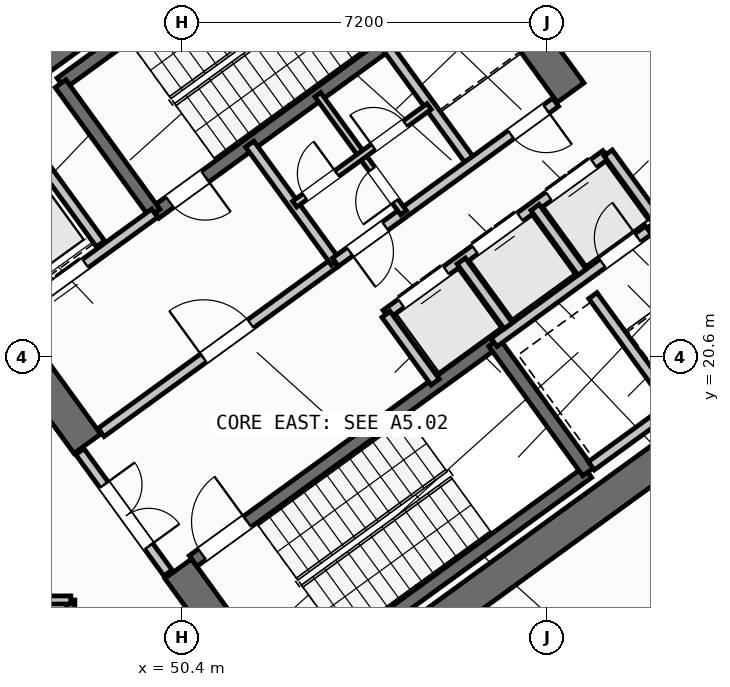
"""IFC4 building model, lengths in metres.
Left out: names, types, materials, properties, quantities, classifications, styles, units other than length and angle.
Written with IfcOpenShell. Run it as: python <this file> out.ifc"""

import sys

from ifc_helpers import new_model, si_unit, direction, frame, frame_2d, origin, place, context, subcontext, project, spatial, rectangle, extrude, source, transform, mapped, element, fill, save


model = new_model("IFC4")
c1 = context("Model", 3, precision=1e-05, world=origin(), true_north=direction((0.0, 1.0)))
c2 = subcontext(c1, "Body", "Model", "MODEL_VIEW")
j1 = project(units=[si_unit("LENGTHUNIT", "METRE"), si_unit("PLANEANGLEUNIT", "RADIAN")], contexts=[c1])
p1 = place(None, origin())
s1 = spatial("IfcSite", under=j1, at=p1, CompositionType="ELEMENT")
p2 = place(p1, origin())
s2 = spatial("IfcBuilding", under=s1, at=p2, CompositionType="ELEMENT")
p3 = place(p2, frame((0.0, 0.0, 5.4)))
s3 = spatial("IfcBuildingStorey", under=s2, at=p3, CompositionType="ELEMENT", Elevation=5.4)
p4 = place(p3, frame((52.318, 13.11, 0.0), z_axis=(0.0, 0.0, 1.0), x_axis=(0.809019445368, 0.587781878776, 0.0)))
e1 = element("IfcWall", 1, at=p4, inside=s3, PredefinedType="SHEAR", context=c2, shape_type="SweptSolid", body=[
    extrude(rectangle(XDim=12.44, YDim=0.65, at=frame_2d((6.22, 0.0))), origin(), (0.0, 0.0, 1.0), 4.45),
])
p5 = place(p3, frame((44.325, 24.113, 0.0), z_axis=(0.0, 0.0, 1.0), x_axis=(0.809012664862, 0.58779121131, 0.0)))
e2 = element("IfcWall", 2, at=p5, inside=s3, PredefinedType="SHEAR", context=c2, shape_type="SweptSolid", body=[
    extrude(rectangle(XDim=12.44, YDim=0.65, at=frame_2d((6.22, 0.0))), origin(), (0.0, 0.0, 1.0), 4.45),
])
p6 = place(p3, frame((52.39, 13.564, 0.0), z_axis=(0.0, 0.0, 1.0), x_axis=(-0.58779688989, 0.809008539037, 0.0)))
e3 = element("IfcWall", 3, at=p6, inside=s3, PredefinedType="SHEAR", context=c2, shape_type="SweptSolid", body=[
    extrude(rectangle(XDim=3.525, YDim=0.65, at=frame_2d((1.763, 0.0))), origin(), (0.0, 0.0, 1.0), 4.45),
])
p7 = place(p3, frame((48.526, 18.884, 0.0), z_axis=(0.0, 0.0, 1.0), x_axis=(-0.58777996584, 0.809020835181, 0.0)))
e4 = element("IfcWall", 4, at=p7, inside=s3, PredefinedType="SHEAR", context=c2, shape_type="SweptSolid", body=[
    extrude(rectangle(XDim=6.375, YDim=0.65, at=frame_2d((3.188, 0.0))), origin(), (0.0, 0.0, 1.0), 4.45),
])
p8 = place(p3, frame((61.929, 20.494, 0.0), z_axis=(0.0, 0.0, 1.0), x_axis=(-0.58782982593, 0.808984607855, 0.0)))
e5 = element("IfcWall", 5, at=p8, inside=s3, PredefinedType="SHEAR", context=c2, shape_type="SweptSolid", body=[
    extrude(rectangle(XDim=3.525, YDim=0.65, at=frame_2d((1.762, 0.0))), origin(), (0.0, 0.0, 1.0), 4.45),
])
p9 = place(p3, frame((58.064, 25.813, 0.0), z_axis=(0.0, 0.0, 1.0), x_axis=(-0.58777996584, 0.809020835181, 0.0)))
e6 = element("IfcWall", 6, at=p9, inside=s3, PredefinedType="SHEAR", context=c2, shape_type="SweptSolid", body=[
    extrude(rectangle(XDim=6.375, YDim=0.65, at=frame_2d((3.188, 0.0))), origin(), (0.0, 0.0, 1.0), 4.45),
])
p10 = place(p3, frame((48.006, 25.996, 0.0), z_axis=(0.0, 0.0, 1.0), x_axis=(0.80901903764, 0.587782439969, 0.0)))
e7 = element("IfcWall", 7, at=p10, inside=s3, PredefinedType="SHEAR", context=c2, shape_type="SweptSolid", body=[
    extrude(rectangle(XDim=7.46, YDim=0.26, at=frame_2d((3.73, 0.0))), origin(), (0.0, 0.0, 1.0), 4.45),
])
p11 = place(p3, frame((49.863, 23.44, 0.0), z_axis=(0.0, 0.0, 1.0), x_axis=(0.809003474932, 0.587803859759, 0.0)))
e8 = element("IfcWall", 8, at=p11, inside=s3, PredefinedType="SHEAR", context=c2, shape_type="SweptSolid", body=[
    extrude(rectangle(XDim=7.46, YDim=0.26, at=frame_2d((3.73, 0.0))), origin(), (0.0, 0.0, 1.0), 4.45),
])
p12 = place(p11, frame((0.36, 0.0, 0.0)))
e9 = element("IfcOpeningElement", 9, at=p12, cuts=e8, PredefinedType="OPENING", context=c2, shape_type="SweptSolid", body=[
    extrude(rectangle(XDim=0.86, YDim=2.05, at=frame_2d((0.43, 1.025))), frame((0.0, 0.14, 0.0), z_axis=(0.0, -1.0, 0.0), x_axis=(1.0, 0.0, 0.0)), (0.0, 0.0, 1.0), 0.28),
])
p13 = place(p3, frame((49.855, 23.434, 0.0), z_axis=(0.0, 0.0, 1.0), x_axis=(-0.58776738483, 0.809029975545, 0.0)))
e10 = element("IfcWall", 10, at=p13, inside=s3, PredefinedType="SHEAR", context=c2, shape_type="SweptSolid", body=[
    extrude(rectangle(XDim=3.16, YDim=0.26, at=frame_2d((1.58, 0.0))), origin(), (0.0, 0.0, 1.0), 4.45),
])
p14 = place(p3, frame((52.472, 14.013, 0.0), z_axis=(0.0, 0.0, 1.0), x_axis=(0.809028366311, 0.587769599847, 0.0)))
e11 = element("IfcWall", 11, at=p14, inside=s3, PredefinedType="SHEAR", context=c2, shape_type="SweptSolid", body=[
    extrude(rectangle(XDim=7.33, YDim=0.26, at=frame_2d((3.665, 0.0))), origin(), (0.0, 0.0, 1.0), 4.45),
])
p15 = place(p3, frame((50.615, 16.57, 0.0), z_axis=(0.0, 0.0, 1.0), x_axis=(0.809028366311, 0.587769599847, 0.0)))
e12 = element("IfcWall", 12, at=p15, inside=s3, PredefinedType="SHEAR", context=c2, shape_type="SweptSolid", body=[
    extrude(rectangle(XDim=7.33, YDim=0.26, at=frame_2d((3.665, 0.0))), origin(), (0.0, 0.0, 1.0), 4.45),
])
p16 = place(p15, frame((0.22, 0.0, 0.0)))
e13 = element("IfcOpeningElement", 13, at=p16, cuts=e12, PredefinedType="OPENING", context=c2, shape_type="SweptSolid", body=[
    extrude(rectangle(XDim=1.1, YDim=2.1, at=frame_2d((0.55, 1.05))), frame((0.0, 0.14, 0.0), z_axis=(0.0, -1.0, 0.0), x_axis=(1.0, 0.0, 0.0)), (0.0, 0.0, 1.0), 0.28),
])
p17 = place(p3, frame((58.41, 18.327, 0.0), z_axis=(0.0, 0.0, 1.0), x_axis=(-0.58776738483, 0.809029975545, 0.0)))
e14 = element("IfcWall", 14, at=p17, inside=s3, PredefinedType="SHEAR", context=c2, shape_type="SweptSolid", body=[
    extrude(rectangle(XDim=3.16, YDim=0.26, at=frame_2d((1.58, 0.0))), origin(), (0.0, 0.0, 1.0), 4.45),
])
p18 = place(p3, frame((47.106, 21.437, 0.0), z_axis=(0.0, 0.0, 1.0), x_axis=(0.809012514015, 0.58779141893, 0.0)))
e15 = element("IfcWall", 15, at=p18, inside=s3, PredefinedType="STANDARD", context=c2, shape_type="SweptSolid", body=[
    extrude(rectangle(XDim=3.398, YDim=0.2, at=frame_2d((1.699, 0.0))), origin(), (0.0, 0.0, 1.0), 4.44),
])
p19 = place(p18, frame((0.408, 0.0, 0.0)))
e16 = element("IfcOpeningElement", 16, at=p19, cuts=e15, PredefinedType="OPENING", context=c2, shape_type="SweptSolid", body=[
    extrude(rectangle(XDim=1.3, YDim=2.2, at=frame_2d((0.65, 1.1))), frame((0.0, 0.11, 0.0), z_axis=(0.0, -1.0, 0.0), x_axis=(1.0, 0.0, 0.0)), (0.0, 0.0, 1.0), 0.22),
])
p20 = place(p3, frame((48.799, 19.107, 0.0), z_axis=(0.0, 0.0, 1.0), x_axis=(0.809012959416, 0.587790805897, 0.0)))
e17 = element("IfcWall", 17, at=p20, inside=s3, PredefinedType="STANDARD", context=c2, shape_type="SweptSolid", body=[
    extrude(rectangle(XDim=5.718, YDim=0.2, at=frame_2d((2.859, 0.0))), origin(), (0.0, 0.0, 1.0), 4.44),
])
p21 = place(p20, frame((2.498, 0.0, 0.0)))
e18 = element("IfcOpeningElement", 18, at=p21, cuts=e17, PredefinedType="OPENING", context=c2, shape_type="SweptSolid", body=[
    extrude(rectangle(XDim=1.15, YDim=2.1, at=frame_2d((0.575, 1.05))), frame((0.0, 0.11, 0.0), z_axis=(0.0, -1.0, 0.0), x_axis=(1.0, 0.0, 0.0)), (0.0, 0.0, 1.0), 0.22),
])
p22 = place(p3, frame((56.553, 20.884, 0.0), z_axis=(0.0, 0.0, 1.0), x_axis=(0.809035789462, 0.587759382205, 0.0)))
e19 = element("IfcWall", 19, at=p22, inside=s3, PredefinedType="STANDARD", context=c2, shape_type="SweptSolid", body=[
    extrude(rectangle(XDim=3.768, YDim=0.2, at=frame_2d((1.884, 0.0))), origin(), (0.0, 0.0, 1.0), 4.44),
])
p23 = place(p22, frame((2.65, 0.0, 0.0)))
e20 = element("IfcOpeningElement", 20, at=p23, cuts=e19, PredefinedType="OPENING", context=c2, shape_type="SweptSolid", body=[
    extrude(rectangle(XDim=0.86, YDim=2.05, at=frame_2d((0.43, 1.025))), frame((0.0, 0.11, 0.0), z_axis=(0.0, -1.0, 0.0), x_axis=(1.0, 0.0, 0.0)), (0.0, 0.0, 1.0), 0.22),
])
p24 = place(p3, frame((54.421, 21.436, 0.0), z_axis=(0.0, 0.0, 1.0), x_axis=(0.809013710463, 0.587789772183, 0.0)))
e21 = element("IfcWall", 21, at=p24, inside=s3, PredefinedType="STANDARD", context=c2, shape_type="SweptSolid", body=[
    extrude(rectangle(XDim=5.36, YDim=0.2, at=frame_2d((2.68, 0.0))), origin(), (0.0, 0.0, 1.0), 4.44),
])
p25 = place(p24, frame((0.37, 0.0, 0.0)))
e22 = element("IfcOpeningElement", 22, at=p25, cuts=e21, PredefinedType="OPENING", context=c2, shape_type="SweptSolid", body=[
    extrude(rectangle(XDim=1.1, YDim=2.15, at=frame_2d((0.55, 1.075))), frame((0.0, 0.11, 0.0), z_axis=(0.0, -1.0, 0.0), x_axis=(1.0, 0.0, 0.0)), (0.0, 0.0, 1.0), 0.22),
])
p26 = place(p24, frame((2.17, 0.0, 0.0)))
e23 = element("IfcOpeningElement", 23, at=p26, cuts=e21, PredefinedType="OPENING", context=c2, shape_type="SweptSolid", body=[
    extrude(rectangle(XDim=1.1, YDim=2.15, at=frame_2d((0.55, 1.075))), frame((0.0, 0.11, 0.0), z_axis=(0.0, -1.0, 0.0), x_axis=(1.0, 0.0, 0.0)), (0.0, 0.0, 1.0), 0.22),
])
p27 = place(p24, frame((3.97, 0.0, 0.0)))
e24 = element("IfcOpeningElement", 24, at=p27, cuts=e21, PredefinedType="OPENING", context=c2, shape_type="SweptSolid", body=[
    extrude(rectangle(XDim=1.1, YDim=2.15, at=frame_2d((0.55, 1.075))), frame((0.0, 0.11, 0.0), z_axis=(0.0, -1.0, 0.0), x_axis=(1.0, 0.0, 0.0)), (0.0, 0.0, 1.0), 0.22),
])
p28 = place(p3, frame((55.391, 20.102, 0.0), z_axis=(0.0, 0.0, 1.0), x_axis=(-0.58778447739, 0.809017557374, 0.0)))
e25 = element("IfcWall", 25, at=p28, inside=s3, PredefinedType="STANDARD", context=c2, shape_type="SweptSolid", body=[
    extrude(rectangle(XDim=1.65, YDim=0.2, at=frame_2d((0.825, 0.0))), origin(), (0.0, 0.0, 1.0), 4.44),
])
p29 = place(p3, frame((48.786, 22.83, 0.0), z_axis=(0.0, 0.0, 1.0), x_axis=(-0.587783856777, 0.809018008275, 0.0)))
e26 = element("IfcWall", 26, at=p29, inside=s3, PredefinedType="STANDARD", context=c2, shape_type="SweptSolid", body=[
    extrude(rectangle(XDim=2.92, YDim=0.2, at=frame_2d((1.46, 0.0))), origin(), (0.0, 0.0, 1.0), 4.44),
])
p30 = place(p3, frame((56.834, 21.212, 0.0), z_axis=(0.0, 0.0, 1.0), x_axis=(-0.58776738483, 0.809029975545, 0.0)))
e27 = element("IfcWall", 27, at=p30, inside=s3, PredefinedType="STANDARD", context=c2, shape_type="SweptSolid", body=[
    extrude(rectangle(XDim=1.58, YDim=0.2, at=frame_2d((0.79, 0.0))), origin(), (0.0, 0.0, 1.0), 4.44),
])
p31 = place(p3, frame((58.29, 22.27, 0.0), z_axis=(0.0, 0.0, 1.0), x_axis=(-0.587840865826, 0.808976585857, 0.0)))
e28 = element("IfcWall", 28, at=p31, inside=s3, PredefinedType="STANDARD", context=c2, shape_type="SweptSolid", body=[
    extrude(rectangle(XDim=1.58, YDim=0.2, at=frame_2d((0.79, 0.0))), origin(), (0.0, 0.0, 1.0), 4.44),
])
p32 = place(p3, frame((59.758, 23.312, 0.0), z_axis=(0.0, 0.0, 1.0), x_axis=(-0.587875962906, 0.808951081486, 0.0)))
e29 = element("IfcWall", 29, at=p32, inside=s3, PredefinedType="STANDARD", context=c2, shape_type="SweptSolid", body=[
    extrude(rectangle(XDim=1.62, YDim=0.2, at=frame_2d((0.81, 0.0))), origin(), (0.0, 0.0, 1.0), 4.44),
])
p33 = place(p3, frame((60.067, 19.655, 0.0), z_axis=(0.0, 0.0, 1.0), x_axis=(-0.587800520745, 0.809005900975, 0.0)))
e30 = element("IfcWall", 30, at=p33, inside=s3, PredefinedType="STANDARD", context=c2, shape_type="SweptSolid", body=[
    extrude(rectangle(XDim=2.66, YDim=0.2, at=frame_2d((1.33, 0.0))), origin(), (0.0, 0.0, 1.0), 4.44),
])
p34 = place(p3, frame((58.472, 18.447, 0.0), z_axis=(0.0, 0.0, 1.0), x_axis=(0.809022487728, 0.587777691266, 0.0)))
e31 = element("IfcWall", 31, at=p34, inside=s3, PredefinedType="STANDARD", context=c2, shape_type="SweptSolid", body=[
    extrude(rectangle(XDim=3.648, YDim=0.2, at=frame_2d((1.824, 0.0))), origin(), (0.0, 0.0, 1.0), 4.44),
])
p35 = place(p3, frame((53.425, 22.468, 0.0), z_axis=(0.0, 0.0, 1.0), x_axis=(-0.5877230039, 0.809062216821, 0.0)))
e32 = element("IfcWall", 32, at=p35, inside=s3, PredefinedType="STANDARD", context=c2, shape_type="SweptSolid", body=[
    extrude(rectangle(XDim=2.88, YDim=0.2, at=frame_2d((1.44, 0.0))), origin(), (0.0, 0.0, 1.0), 4.44),
])
p36 = place(p3, frame((56.111, 24.419, 0.0), z_axis=(0.0, 0.0, 1.0), x_axis=(-0.58777848983, 0.809021907548, 0.0)))
e33 = element("IfcWall", 33, at=p36, inside=s3, PredefinedType="STANDARD", context=c2, shape_type="SweptSolid", body=[
    extrude(rectangle(XDim=2.88, YDim=0.2, at=frame_2d((1.44, 0.0))), origin(), (0.0, 0.0, 1.0), 4.44),
])
p37 = place(p3, frame((53.425, 22.468, 0.0), z_axis=(0.0, 0.0, 1.0), x_axis=(0.80902705128, 0.587771409902, 0.0)))
e34 = element("IfcWall", 34, at=p37, inside=s3, PredefinedType="STANDARD", context=c2, shape_type="SweptSolid", body=[
    extrude(rectangle(XDim=5.368, YDim=0.2, at=frame_2d((2.684, 0.0))), origin(), (0.0, 0.0, 1.0), 4.44),
])
p38 = place(p37, frame((4.28, 0.0, 0.0)))
e35 = element("IfcOpeningElement", 35, at=p38, cuts=e34, PredefinedType="OPENING", context=c2, shape_type="SweptSolid", body=[
    extrude(rectangle(XDim=0.86, YDim=2.05, at=frame_2d((0.43, 1.025))), frame((0.0, 0.11, 0.0), z_axis=(0.0, -1.0, 0.0), x_axis=(1.0, 0.0, 0.0)), (0.0, 0.0, 1.0), 0.22),
])
p39 = place(p37, frame((0.35, 0.0, 0.0)))
e36 = element("IfcOpeningElement", 36, at=p39, cuts=e34, PredefinedType="OPENING", context=c2, shape_type="SweptSolid", body=[
    extrude(rectangle(XDim=0.86, YDim=2.05, at=frame_2d((0.43, 1.025))), frame((0.0, 0.11, 0.0), z_axis=(0.0, -1.0, 0.0), x_axis=(1.0, 0.0, 0.0)), (0.0, 0.0, 1.0), 0.22),
])
p40 = place(p3, frame((54.768, 23.443, 0.0), z_axis=(0.0, 0.0, 1.0), x_axis=(-0.587736077749, 0.809052719489, 0.0)))
e37 = element("IfcWall", 37, at=p40, inside=s3, PredefinedType="PLUMBINGWALL", context=c2, shape_type="SweptSolid", body=[
    extrude(rectangle(XDim=1.4, YDim=0.14, at=frame_2d((0.7, 0.0))), origin(), (0.0, 0.0, 1.0), 4.44),
])
p41 = place(p40, frame((0.28, 0.0, 0.0)))
e38 = element("IfcOpeningElement", 38, at=p41, cuts=e37, PredefinedType="OPENING", context=c2, shape_type="SweptSolid", body=[
    extrude(rectangle(XDim=0.78, YDim=2.05, at=frame_2d((0.39, 1.025))), frame((0.0, 0.08, 0.0), z_axis=(0.0, -1.0, 0.0), x_axis=(1.0, 0.0, 0.0)), (0.0, 0.0, 1.0), 0.16),
])
p42 = place(p3, frame((53.945, 24.576, 0.0), z_axis=(0.0, 0.0, 1.0), x_axis=(-0.587897037186, 0.808935766095, 0.0)))
e39 = element("IfcWall", 39, at=p42, inside=s3, PredefinedType="PLUMBINGWALL", context=c2, shape_type="SweptSolid", body=[
    extrude(rectangle(XDim=1.48, YDim=0.14, at=frame_2d((0.74, 0.0))), origin(), (0.0, 0.0, 1.0), 4.44),
])
p43 = place(p3, frame((52.618, 23.612, 0.0), z_axis=(0.0, 0.0, 1.0), x_axis=(0.809009587469, 0.587795446889, 0.0)))
e40 = element("IfcWall", 40, at=p43, inside=s3, PredefinedType="PLUMBINGWALL", context=c2, shape_type="SweptSolid", body=[
    extrude(rectangle(XDim=3.28, YDim=0.14, at=frame_2d((1.64, 0.0))), origin(), (0.0, 0.0, 1.0), 4.44),
])
p44 = place(p43, frame((0.25, 0.0, 0.0)))
e41 = element("IfcOpeningElement", 41, at=p44, cuts=e40, PredefinedType="OPENING", context=c2, shape_type="SweptSolid", body=[
    extrude(rectangle(XDim=0.78, YDim=2.05, at=frame_2d((0.39, 1.025))), frame((0.0, 0.08, 0.0), z_axis=(0.0, -1.0, 0.0), x_axis=(1.0, 0.0, 0.0)), (0.0, 0.0, 1.0), 0.16),
])
p45 = place(p43, frame((1.92, 0.0, 0.0)))
e42 = element("IfcOpeningElement", 42, at=p45, cuts=e40, PredefinedType="OPENING", context=c2, shape_type="SweptSolid", body=[
    extrude(rectangle(XDim=0.78, YDim=2.05, at=frame_2d((0.39, 1.025))), frame((0.0, 0.08, 0.0), z_axis=(0.0, -1.0, 0.0), x_axis=(1.0, 0.0, 0.0)), (0.0, 0.0, 1.0), 0.16),
])
p46 = place(p3, frame((50.119, 16.333, 0.0), z_axis=(0.0, 0.0, 1.0), x_axis=(-0.587749856981, 0.809042709391, 0.0)))
e43 = element("IfcWall", 43, at=p46, inside=s3, PredefinedType="STANDARD", context=c2, shape_type="SweptSolid", body=[
    extrude(rectangle(XDim=2.96, YDim=0.2, at=frame_2d((1.48, 0.0))), origin(), (0.0, 0.0, 1.0), 4.44),
])
p47 = place(p46, frame((0.65, 0.0, 0.0)))
e44 = element("IfcOpeningElement", 44, at=p47, cuts=e43, PredefinedType="OPENING", context=c2, shape_type="SweptSolid", body=[
    extrude(rectangle(XDim=1.5, YDim=2.15, at=frame_2d((0.75, 1.075))), frame((0.0, 0.11, 0.0), z_axis=(0.0, -1.0, 0.0), x_axis=(1.0, 0.0, 0.0)), (0.0, 0.0, 1.0), 0.22),
])
p48 = place(p3, frame((48.2, 10.58, 0.0), z_axis=(0.0, 0.0, 1.0), x_axis=(0.0, 1.0, 0.0)))
e45 = element("IfcWall", 45, at=p48, inside=s3, PredefinedType="PARTITIONING", context=c2, shape_type="SweptSolid", body=[
    extrude(rectangle(XDim=5.22, YDim=0.16, at=frame_2d((2.61, 0.0))), origin(), (0.0, 0.0, 1.0), 4.44),
])
p49 = place(p3, frame((35.534, 15.8, 0.0), z_axis=(0.0, 0.0, 1.0), x_axis=(1.0, 0.0, 0.0)))
e46 = element("IfcWall", 46, at=p49, inside=s3, PredefinedType="PARTITIONING", context=c2, shape_type="SweptSolid", body=[
    extrude(rectangle(XDim=12.666, YDim=0.16, at=frame_2d((6.333, 0.0))), origin(), (0.0, 0.0, 1.0), 4.44),
])
m1 = source(origin(), c2, "Body", "SweptSolid", [
    extrude(rectangle(XDim=0.86, YDim=2.05, at=frame_2d((0.43, 1.025))), frame((0.0, 0.025, 0.0), z_axis=(0.0, -1.0, 0.0), x_axis=(1.0, 0.0, 0.0)), (0.0, 0.0, 1.0), 0.05),
])
p50 = place(p12, frame((0.86, 0.0, 0.0), z_axis=(0.0, 0.0, 1.0), x_axis=(-1.0, 0.0, 0.0)))
e47 = element("IfcDoor", 47, at=p50, inside=s3, OperationType="SINGLE_SWING_LEFT", PredefinedType="DOOR", context=c2, shape_type="MappedRepresentation", body=[
    mapped(m1, transform((0.0, 0.0, 0.0), scale=1.0)),
])
fill(e9, e47)
m2 = source(origin(), c2, "Body", "SweptSolid", [
    extrude(rectangle(XDim=1.1, YDim=2.1, at=frame_2d((0.55, 1.05))), frame((0.0, 0.025, 0.0), z_axis=(0.0, -1.0, 0.0), x_axis=(1.0, 0.0, 0.0)), (0.0, 0.0, 1.0), 0.05),
])
p51 = place(p16, origin())
e48 = element("IfcDoor", 48, at=p51, inside=s3, OperationType="SINGLE_SWING_RIGHT", PredefinedType="DOOR", context=c2, shape_type="MappedRepresentation", body=[
    mapped(m2, transform((0.0, 0.0, 0.0), scale=1.0)),
])
fill(e13, e48)
m3 = source(origin(), c2, "Body", "SweptSolid", [
    extrude(rectangle(XDim=1.15, YDim=2.1, at=frame_2d((0.575, 1.05))), frame((0.0, 0.025, 0.0), z_axis=(0.0, -1.0, 0.0), x_axis=(1.0, 0.0, 0.0)), (0.0, 0.0, 1.0), 0.05),
])
p52 = place(p21, origin())
e49 = element("IfcDoor", 49, at=p52, inside=s3, OperationType="SINGLE_SWING_LEFT", PredefinedType="DOOR", context=c2, shape_type="MappedRepresentation", body=[
    mapped(m3, transform((0.0, 0.0, 0.0), scale=1.0)),
])
fill(e18, e49)
m4 = source(origin(), c2, "Body", "SweptSolid", [
    extrude(rectangle(XDim=1.3, YDim=2.2, at=frame_2d((0.65, 1.1))), frame((0.0, 0.025, 0.0), z_axis=(0.0, -1.0, 0.0), x_axis=(1.0, 0.0, 0.0)), (0.0, 0.0, 1.0), 0.05),
])
p53 = place(p19, origin())
e50 = element("IfcDoor", 50, at=p53, inside=s3, OperationType="DOUBLE_DOOR_SLIDING", PredefinedType="DOOR", context=c2, shape_type="MappedRepresentation", body=[
    mapped(m4, transform((0.0, 0.0, 0.0), scale=1.0)),
])
fill(e16, e50)
m5 = source(origin(), c2, "Body", "SweptSolid", [
    extrude(rectangle(XDim=1.1, YDim=2.15, at=frame_2d((0.55, 1.075))), frame((0.0, 0.025, 0.0), z_axis=(0.0, -1.0, 0.0), x_axis=(1.0, 0.0, 0.0)), (0.0, 0.0, 1.0), 0.05),
])
p54 = place(p25, origin())
e51 = element("IfcDoor", 51, at=p54, inside=s3, OperationType="DOUBLE_DOOR_SLIDING", PredefinedType="DOOR", context=c2, shape_type="MappedRepresentation", body=[
    mapped(m5, transform((0.0, 0.0, 0.0), scale=1.0)),
])
fill(e22, e51)
p55 = place(p26, origin())
e52 = element("IfcDoor", 52, at=p55, inside=s3, OperationType="DOUBLE_DOOR_SLIDING", PredefinedType="DOOR", context=c2, shape_type="MappedRepresentation", body=[
    mapped(m5, transform((0.0, 0.0, 0.0), scale=1.0)),
])
fill(e23, e52)
p56 = place(p27, origin())
e53 = element("IfcDoor", 53, at=p56, inside=s3, OperationType="DOUBLE_DOOR_SLIDING", PredefinedType="DOOR", context=c2, shape_type="MappedRepresentation", body=[
    mapped(m5, transform((0.0, 0.0, 0.0), scale=1.0)),
])
fill(e24, e53)
p57 = place(p23, origin())
e54 = element("IfcDoor", 54, at=p57, inside=s3, OperationType="SINGLE_SWING_RIGHT", PredefinedType="DOOR", context=c2, shape_type="MappedRepresentation", body=[
    mapped(m1, transform((0.0, 0.0, 0.0), scale=1.0)),
])
fill(e20, e54)
p58 = place(p38, frame((0.86, 0.0, 0.0), z_axis=(0.0, 0.0, 1.0), x_axis=(-1.0, 0.0, 0.0)))
e55 = element("IfcDoor", 55, at=p58, inside=s3, OperationType="SINGLE_SWING_LEFT", PredefinedType="DOOR", context=c2, shape_type="MappedRepresentation", body=[
    mapped(m1, transform((0.0, 0.0, 0.0), scale=1.0)),
])
fill(e35, e55)
p59 = place(p39, frame((0.86, 0.0, 0.0), z_axis=(0.0, 0.0, 1.0), x_axis=(-1.0, 0.0, 0.0)))
e56 = element("IfcDoor", 56, at=p59, inside=s3, OperationType="SINGLE_SWING_RIGHT", PredefinedType="DOOR", context=c2, shape_type="MappedRepresentation", body=[
    mapped(m1, transform((0.0, 0.0, 0.0), scale=1.0)),
])
fill(e36, e56)
m6 = source(origin(), c2, "Body", "SweptSolid", [
    extrude(rectangle(XDim=0.78, YDim=2.05, at=frame_2d((0.39, 1.025))), frame((0.0, 0.025, 0.0), z_axis=(0.0, -1.0, 0.0), x_axis=(1.0, 0.0, 0.0)), (0.0, 0.0, 1.0), 0.05),
])
p60 = place(p41, origin())
e57 = element("IfcDoor", 57, at=p60, inside=s3, OperationType="SINGLE_SWING_LEFT", PredefinedType="DOOR", context=c2, shape_type="MappedRepresentation", body=[
    mapped(m6, transform((0.0, 0.0, 0.0), scale=1.0)),
])
fill(e38, e57)
p61 = place(p44, origin())
e58 = element("IfcDoor", 58, at=p61, inside=s3, OperationType="SINGLE_SWING_RIGHT", PredefinedType="DOOR", context=c2, shape_type="MappedRepresentation", body=[
    mapped(m6, transform((0.0, 0.0, 0.0), scale=1.0)),
])
fill(e41, e58)
p62 = place(p45, origin())
e59 = element("IfcDoor", 59, at=p62, inside=s3, OperationType="SINGLE_SWING_LEFT", PredefinedType="DOOR", context=c2, shape_type="MappedRepresentation", body=[
    mapped(m6, transform((0.0, 0.0, 0.0), scale=1.0)),
])
fill(e42, e59)
m7 = source(origin(), c2, "Body", "SweptSolid", [
    extrude(rectangle(XDim=1.5, YDim=2.15, at=frame_2d((0.75, 1.075))), frame((0.0, 0.025, 0.0), z_axis=(0.0, -1.0, 0.0), x_axis=(1.0, 0.0, 0.0)), (0.0, 0.0, 1.0), 0.05),
])
p63 = place(p47, frame((1.5, 0.0, 0.0), z_axis=(0.0, 0.0, 1.0), x_axis=(-1.0, 0.0, 0.0)))
e60 = element("IfcDoor", 60, at=p63, inside=s3, OperationType="DOUBLE_DOOR_SINGLE_SWING", PredefinedType="DOOR", context=c2, shape_type="MappedRepresentation", body=[
    mapped(m7, transform((0.0, 0.0, 0.0), scale=1.0)),
])
fill(e44, e60)
save(model, sys.argv[1])
